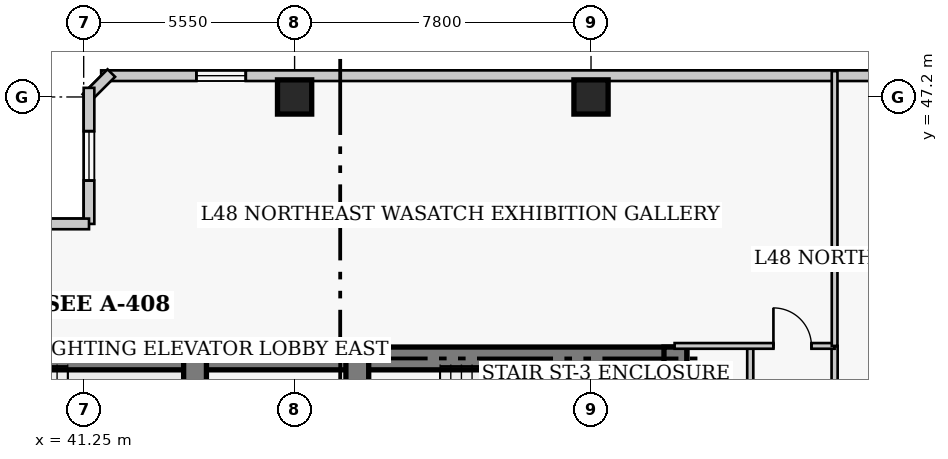
"""IFC4 building model, lengths in metres.
Left out: names, types, materials, properties, quantities, classifications, styles, units other than length and angle.
Written with IfcOpenShell. Run it as: python <this file> out.ifc"""

import sys

from ifc_helpers import new_model, si_unit, direction, frame, frame_2d, origin, origin_2d, place, context, subcontext, project, spatial, rectangle, extrude, element, fill, save


model = new_model("IFC4")
c1 = context("Model", 3, precision=1e-05, world=origin(), true_north=direction((0.0, 1.0)))
c2 = subcontext(c1, "Body", "Model", "MODEL_VIEW")
j1 = project(units=[si_unit("LENGTHUNIT", "METRE"), si_unit("PLANEANGLEUNIT", "RADIAN")], contexts=[c1])
p1 = place(None, origin())
s1 = spatial("IfcSite", under=j1, at=p1, CompositionType="ELEMENT")
p2 = place(p1, origin())
s2 = spatial("IfcBuilding", under=s1, at=p2, CompositionType="ELEMENT")
p3 = place(p2, frame((0.0, 0.0, 192.9)))
s3 = spatial("IfcBuildingStorey", under=s2, at=p3, CompositionType="ELEMENT", Elevation=192.9)
p4 = place(p3, frame((35.85, 40.32, 0.0), z_axis=(0.0, 0.0, 1.0), x_axis=(1.0, 0.0, 0.0)))
e1 = element("IfcWall", 1, at=p4, inside=s3, PredefinedType="SHEAR", context=c2, shape_type="SweptSolid", body=[
    extrude(rectangle(XDim=12.6, YDim=0.6, at=frame_2d((6.3, 0.0))), origin(), (0.0, 0.0, 1.0), 3.9),
])
p5 = place(p3, frame((48.45, 40.32, 0.0), z_axis=(0.0, 0.0, 1.0), x_axis=(1.0, 0.0, 0.0)))
e2 = element("IfcWall", 2, at=p5, inside=s3, PredefinedType="SHEAR", context=c2, shape_type="SweptSolid", body=[
    extrude(rectangle(XDim=8.67, YDim=0.6, at=frame_2d((4.335, 0.0))), origin(), (0.0, 0.0, 1.0), 3.9),
])
p6 = place(p3, frame((56.82, 27.05, 0.0), z_axis=(0.0, 0.0, 1.0), x_axis=(0.0, 1.0, 0.0)))
e3 = element("IfcWall", 3, at=p6, inside=s3, PredefinedType="SHEAR", context=c2, shape_type="SweptSolid", body=[
    extrude(rectangle(XDim=13.57, YDim=0.6, at=frame_2d((6.785, 0.0))), origin(), (0.0, 0.0, 1.0), 3.9),
])
p7 = place(p3, frame((44.18, 36.37, 0.0), z_axis=(0.0, 0.0, 1.0), x_axis=(0.0, 1.0, 0.0)))
e4 = element("IfcWall", 4, at=p7, inside=s3, PredefinedType="SHEAR", context=c2, shape_type="SweptSolid", body=[
    extrude(rectangle(XDim=3.95, YDim=0.6, at=frame_2d((1.975, 0.0))), origin(), (0.0, 0.0, 1.0), 3.9),
])
p8 = place(p3, frame((48.45, 32.45, 0.0), z_axis=(0.0, 0.0, 1.0), x_axis=(0.0, 1.0, 0.0)))
e5 = element("IfcWall", 5, at=p8, inside=s3, PredefinedType="SHEAR", context=c2, shape_type="SweptSolid", body=[
    extrude(rectangle(XDim=7.87, YDim=0.6, at=frame_2d((3.935, 0.0))), origin(), (0.0, 0.0, 1.0), 3.9),
])
p9 = place(p8, frame((5.75, 0.0, 0.0)))
e6 = element("IfcOpeningElement", 6, at=p9, cuts=e5, PredefinedType="OPENING", context=c2, shape_type="SweptSolid", body=[
    extrude(rectangle(XDim=1.1, YDim=2.15, at=frame_2d((0.55, 1.075))), frame((0.0, 0.31, 0.0), z_axis=(0.0, -1.0, 0.0), x_axis=(1.0, 0.0, 0.0)), (0.0, 0.0, 1.0), 0.62),
])
for number, where, z_axis, x_axis in (
    (7, (46.8, 47.2, 0.0), (0.0, 0.0, 1.0), (1.0, 0.0, 0.0)),
    (8, (54.6, 47.2, 0.0), (0.0, 0.0, 1.0), (1.0, 0.0, 0.0)),
):
    element("IfcColumn", number, at=place(p3, frame(where, z_axis=z_axis, x_axis=x_axis)), inside=s3, PredefinedType="COLUMN", context=c2, shape_type="SweptSolid", body=[
        extrude(rectangle(XDim=0.9, YDim=0.9, at=origin_2d()), origin(), (0.0, 0.0, 1.0), 3.9),
    ])
p10 = place(p3, frame((67.54, 47.76, 0.0), z_axis=(0.0, 0.0, 1.0), x_axis=(-1.0, 0.0, 0.0)))
e9 = element("IfcWall", 9, at=p10, inside=s3, PredefinedType="SOLIDWALL", context=c2, shape_type="SweptSolid", body=[
    extrude(rectangle(XDim=25.83, YDim=0.28, at=frame_2d((12.915, 0.0))), origin(), (0.0, 0.0, 1.0), 3.65),
])
p11 = place(p10, frame((3.655, 0.0, 0.85)))
e10 = element("IfcOpeningElement", 10, at=p11, cuts=e9, PredefinedType="OPENING", context=c2, shape_type="SweptSolid", body=[
    extrude(rectangle(XDim=1.3, YDim=1.7, at=frame_2d((0.65, 0.85))), frame((0.0, 0.15, 0.0), z_axis=(0.0, -1.0, 0.0), x_axis=(1.0, 0.0, 0.0)), (0.0, 0.0, 1.0), 0.3),
])
p12 = place(p10, frame((22.025, 0.0, 0.85)))
e11 = element("IfcOpeningElement", 11, at=p12, cuts=e9, PredefinedType="OPENING", context=c2, shape_type="SweptSolid", body=[
    extrude(rectangle(XDim=1.3, YDim=1.7, at=frame_2d((0.65, 0.85))), frame((0.0, 0.15, 0.0), z_axis=(0.0, -1.0, 0.0), x_axis=(1.0, 0.0, 0.0)), (0.0, 0.0, 1.0), 0.3),
])
p13 = place(p3, frame((41.977, 47.829, 0.0), z_axis=(0.0, 0.0, 1.0), x_axis=(-0.706975312048, -0.707238225886, 0.0)))
e12 = element("IfcWall", 12, at=p13, inside=s3, PredefinedType="SOLIDWALL", context=c2, shape_type="SweptSolid", body=[
    extrude(rectangle(XDim=0.929, YDim=0.28, at=frame_2d((0.464, 0.0))), origin(), (0.0, 0.0, 1.0), 3.65),
])
p14 = place(p3, frame((41.39, 47.44, 0.0), z_axis=(0.0, 0.0, 1.0), x_axis=(0.0, -1.0, 0.0)))
e13 = element("IfcWall", 13, at=p14, inside=s3, PredefinedType="SOLIDWALL", context=c2, shape_type="SweptSolid", body=[
    extrude(rectangle(XDim=3.58, YDim=0.28, at=frame_2d((1.79, 0.0))), origin(), (0.0, 0.0, 1.0), 3.65),
])
p15 = place(p14, frame((1.14, 0.0, 0.85)))
e14 = element("IfcOpeningElement", 14, at=p15, cuts=e13, PredefinedType="OPENING", context=c2, shape_type="SweptSolid", body=[
    extrude(rectangle(XDim=1.3, YDim=1.7, at=frame_2d((0.65, 0.85))), frame((0.0, 0.15, 0.0), z_axis=(0.0, -1.0, 0.0), x_axis=(1.0, 0.0, 0.0)), (0.0, 0.0, 1.0), 0.3),
])
p16 = place(p3, frame((41.39, 43.86, 0.0), z_axis=(0.0, 0.0, 1.0), x_axis=(-1.0, 0.0, 0.0)))
e15 = element("IfcWall", 15, at=p16, inside=s3, PredefinedType="SOLIDWALL", context=c2, shape_type="SweptSolid", body=[
    extrude(rectangle(XDim=4.78, YDim=0.28, at=frame_2d((2.39, 0.0))), origin(), (0.0, 0.0, 1.0), 3.65),
])
p17 = place(p16, frame((1.74, 0.0, 0.85)))
e16 = element("IfcOpeningElement", 16, at=p17, cuts=e15, PredefinedType="OPENING", context=c2, shape_type="SweptSolid", body=[
    extrude(rectangle(XDim=1.3, YDim=1.7, at=frame_2d((0.65, 0.85))), frame((0.0, 0.15, 0.0), z_axis=(0.0, -1.0, 0.0), x_axis=(1.0, 0.0, 0.0)), (0.0, 0.0, 1.0), 0.3),
])
p18 = place(p3, frame((61.01, 11.95, 0.0), z_axis=(0.0, 0.0, 1.0), x_axis=(0.0, 1.0, 0.0)))
e17 = element("IfcWall", 17, at=p18, inside=s3, PredefinedType="PARTITIONING", context=c2, shape_type="SweptSolid", body=[
    extrude(rectangle(XDim=28.7, YDim=0.16, at=frame_2d((14.35, 0.0))), origin(), (0.0, 0.0, 1.0), 3.65),
])
p19 = place(p18, frame((0.928, 0.0, 0.0)))
e18 = element("IfcOpeningElement", 18, at=p19, cuts=e17, PredefinedType="OPENING", context=c2, shape_type="SweptSolid", body=[
    extrude(rectangle(XDim=0.95, YDim=2.1, at=frame_2d((0.475, 1.05))), frame((0.0, 0.09, 0.0), z_axis=(0.0, -1.0, 0.0), x_axis=(1.0, 0.0, 0.0)), (0.0, 0.0, 1.0), 0.18),
])
p20 = place(p18, frame((19.775, 0.0, 0.0)))
e19 = element("IfcOpeningElement", 19, at=p20, cuts=e17, PredefinedType="OPENING", context=c2, shape_type="SweptSolid", body=[
    extrude(rectangle(XDim=0.95, YDim=2.1, at=frame_2d((0.475, 1.05))), frame((0.0, 0.09, 0.0), z_axis=(0.0, -1.0, 0.0), x_axis=(1.0, 0.0, 0.0)), (0.0, 0.0, 1.0), 0.18),
])
p21 = place(p18, frame((24.2, 0.0, 0.0)))
e20 = element("IfcOpeningElement", 20, at=p21, cuts=e17, PredefinedType="OPENING", context=c2, shape_type="SweptSolid", body=[
    extrude(rectangle(XDim=1.0, YDim=2.15, at=frame_2d((0.5, 1.075))), frame((0.0, 0.09, 0.0), z_axis=(0.0, -1.0, 0.0), x_axis=(1.0, 0.0, 0.0)), (0.0, 0.0, 1.0), 0.18),
])
p22 = place(p3, frame((58.79, 19.16, 0.0), z_axis=(0.0, 0.0, 1.0), x_axis=(0.0, 1.0, 0.0)))
e21 = element("IfcWall", 21, at=p22, inside=s3, PredefinedType="PARTITIONING", context=c2, shape_type="SweptSolid", body=[
    extrude(rectangle(XDim=21.49, YDim=0.16, at=frame_2d((10.745, 0.0))), origin(), (0.0, 0.0, 1.0), 3.65),
])
p23 = place(p3, frame((56.8, 40.65, 0.0), z_axis=(0.0, 0.0, 1.0), x_axis=(1.0, 0.0, 0.0)))
e22 = element("IfcWall", 22, at=p23, inside=s3, PredefinedType="PARTITIONING", context=c2, shape_type="SweptSolid", body=[
    extrude(rectangle(XDim=4.21, YDim=0.15, at=frame_2d((2.105, 0.0))), origin(), (0.0, 0.0, 1.0), 3.65),
])
p24 = place(p23, frame((2.6, 0.0, 0.0)))
e23 = element("IfcOpeningElement", 23, at=p24, cuts=e22, PredefinedType="OPENING", context=c2, shape_type="SweptSolid", body=[
    extrude(rectangle(XDim=1.0, YDim=2.15, at=frame_2d((0.5, 1.075))), frame((0.0, 0.085, 0.0), z_axis=(0.0, -1.0, 0.0), x_axis=(1.0, 0.0, 0.0)), (0.0, 0.0, 1.0), 0.17),
])
p25 = place(p3, frame((61.01, 40.65, 0.0), z_axis=(0.0, 0.0, 1.0), x_axis=(0.0, 1.0, 0.0)))
e24 = element("IfcWall", 24, at=p25, inside=s3, PredefinedType="PARTITIONING", context=c2, shape_type="SweptSolid", body=[
    extrude(rectangle(XDim=7.23, YDim=0.15, at=frame_2d((3.615, 0.0))), origin(), (0.0, 0.0, 1.0), 3.65),
])
p26 = place(p12, origin())
e25 = element("IfcWindow", 25, at=p26, inside=s3, PartitioningType="SINGLE_PANEL", PredefinedType="WINDOW", context=c2, shape_type="SweptSolid", body=[
    extrude(rectangle(XDim=1.3, YDim=1.7, at=frame_2d((0.65, 0.85))), frame((0.0, 0.03, 0.0), z_axis=(0.0, -1.0, 0.0), x_axis=(1.0, 0.0, 0.0)), (0.0, 0.0, 1.0), 0.06),
])
fill(e11, e25)
p27 = place(p15, origin())
e26 = element("IfcWindow", 26, at=p27, inside=s3, PartitioningType="SINGLE_PANEL", PredefinedType="WINDOW", context=c2, shape_type="SweptSolid", body=[
    extrude(rectangle(XDim=1.3, YDim=1.7, at=frame_2d((0.65, 0.85))), frame((0.0, 0.03, 0.0), z_axis=(0.0, -1.0, 0.0), x_axis=(1.0, 0.0, 0.0)), (0.0, 0.0, 1.0), 0.06),
])
fill(e14, e26)
p28 = place(p24, origin())
e27 = element("IfcDoor", 27, at=p28, inside=s3, OperationType="SINGLE_SWING_LEFT", PredefinedType="DOOR", context=c2, shape_type="SweptSolid", body=[
    extrude(rectangle(XDim=1.0, YDim=2.15, at=frame_2d((0.5, 1.075))), frame((0.0, 0.025, 0.0), z_axis=(0.0, -1.0, 0.0), x_axis=(1.0, 0.0, 0.0)), (0.0, 0.0, 1.0), 0.05),
])
fill(e23, e27)
save(model, sys.argv[1])
